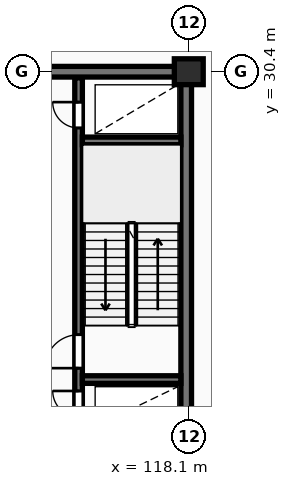
"""IFC4 building model, lengths in metres.
Left out: names, types, materials, properties, quantities, classifications, styles, units other than length and angle.
Written with IfcOpenShell. Run it as: python <this file> out.ifc"""

import sys

from ifc_helpers import new_model, si_unit, direction, frame, frame_2d, origin, origin_2d, place, context, subcontext, project, spatial, rectangle, extrude, element, fill, save


model = new_model("IFC4")
c1 = context("Model", 3, precision=1e-05, world=origin(), true_north=direction((0.0, 1.0)))
c2 = subcontext(c1, "Body", "Model", "MODEL_VIEW")
j1 = project(units=[si_unit("LENGTHUNIT", "METRE"), si_unit("PLANEANGLEUNIT", "RADIAN")], contexts=[c1])
p1 = place(None, origin())
s1 = spatial("IfcSite", under=j1, at=p1, CompositionType="ELEMENT")
p2 = place(p1, origin())
s2 = spatial("IfcBuilding", under=s1, at=p2, CompositionType="ELEMENT")
p3 = place(p2, frame((0.0, 0.0, 76.0)))
s3 = spatial("IfcBuildingStorey", under=s2, at=p3, CompositionType="ELEMENT", Elevation=76.0)
p4 = place(p3, frame((118.1, 30.4, 0.0), z_axis=(0.0, 0.0, 1.0), x_axis=(1.0, 0.0, 0.0)))
e1 = element("IfcColumn", 1, at=p4, inside=s3, PredefinedType="COLUMN", context=c2, shape_type="SweptSolid", body=[
    extrude(rectangle(XDim=0.95, YDim=0.85, at=origin_2d()), origin(), (0.0, 0.0, 1.0), 4.8),
])
p5 = place(p3, frame((81.925, 30.4, 0.0), z_axis=(0.0, 0.0, 1.0), x_axis=(1.0, 0.0, 0.0)))
e2 = element("IfcWall", 2, at=p5, inside=s3, PredefinedType="SHEAR", context=c2, shape_type="SweptSolid", body=[
    extrude(rectangle(XDim=36.265, YDim=0.35, at=frame_2d((18.132, 0.0))), origin(), (0.0, 0.0, 1.0), 4.8),
])
p6 = place(p3, frame((118.015, 18.575, 0.0), z_axis=(0.0, 0.0, 1.0), x_axis=(0.0, 1.0, 0.0)))
e3 = element("IfcWall", 3, at=p6, inside=s3, PredefinedType="SHEAR", context=c2, shape_type="SweptSolid", body=[
    extrude(rectangle(XDim=11.65, YDim=0.35, at=frame_2d((5.825, 0.0))), origin(), (0.0, 0.0, 1.0), 4.8),
])
p7 = place(p3, frame((114.475, 18.6, 0.0), z_axis=(0.0, 0.0, 1.0), x_axis=(0.0, 1.0, 0.0)))
e4 = element("IfcWall", 4, at=p7, inside=s3, PredefinedType="SHEAR", context=c2, shape_type="SweptSolid", body=[
    extrude(rectangle(XDim=11.6, YDim=0.25, at=frame_2d((5.8, 0.0))), origin(), (0.0, 0.0, 1.0), 4.8),
])
p8 = place(p7, frame((0.45, 0.0, 0.0)))
e5 = element("IfcOpeningElement", 5, at=p8, cuts=e4, PredefinedType="OPENING", context=c2, shape_type="SweptSolid", body=[
    extrude(rectangle(XDim=0.85, YDim=2.05, at=frame_2d((0.425, 1.025))), frame((0.0, 0.135, 0.0), z_axis=(0.0, -1.0, 0.0), x_axis=(1.0, 0.0, 0.0)), (0.0, 0.0, 1.0), 0.27),
])
p9 = place(p7, frame((2.05, 0.0, 0.0)))
e6 = element("IfcOpeningElement", 6, at=p9, cuts=e4, PredefinedType="OPENING", context=c2, shape_type="SweptSolid", body=[
    extrude(rectangle(XDim=1.1, YDim=2.1, at=frame_2d((0.55, 1.05))), frame((0.0, 0.135, 0.0), z_axis=(0.0, -1.0, 0.0), x_axis=(1.0, 0.0, 0.0)), (0.0, 0.0, 1.0), 0.27),
])
p10 = place(p7, frame((9.95, 0.0, 0.0)))
e7 = element("IfcOpeningElement", 7, at=p10, cuts=e4, PredefinedType="OPENING", context=c2, shape_type="SweptSolid", body=[
    extrude(rectangle(XDim=0.85, YDim=2.05, at=frame_2d((0.425, 1.025))), frame((0.0, 0.135, 0.0), z_axis=(0.0, -1.0, 0.0), x_axis=(1.0, 0.0, 0.0)), (0.0, 0.0, 1.0), 0.27),
])
for number, where, z_axis, x_axis in (
    (8, (114.6, 20.275, 0.0), (0.0, 0.0, 1.0), (1.0, 0.0, 0.0)),
    (9, (114.6, 28.125, 0.0), (0.0, 0.0, 1.0), (1.0, 0.0, 0.0)),
):
    element("IfcWall", number, at=place(p3, frame(where, z_axis=z_axis, x_axis=x_axis)), inside=s3, PredefinedType="SHEAR", context=c2, shape_type="SweptSolid", body=[
        extrude(rectangle(XDim=3.24, YDim=0.25, at=frame_2d((1.62, 0.0))), origin(), (0.0, 0.0, 1.0), 4.8),
    ])
p11 = place(p8, origin())
e10 = element("IfcDoor", 10, at=p11, inside=s3, OperationType="SINGLE_SWING_RIGHT", PredefinedType="DOOR", context=c2, shape_type="SweptSolid", body=[
    extrude(rectangle(XDim=0.85, YDim=2.05, at=frame_2d((0.425, 1.025))), frame((0.0, 0.025, 0.0), z_axis=(0.0, -1.0, 0.0), x_axis=(1.0, 0.0, 0.0)), (0.0, 0.0, 1.0), 0.05),
])
fill(e5, e10)
p12 = place(p9, origin())
e11 = element("IfcDoor", 11, at=p12, inside=s3, OperationType="SINGLE_SWING_LEFT", PredefinedType="DOOR", context=c2, shape_type="SweptSolid", body=[
    extrude(rectangle(XDim=1.1, YDim=2.1, at=frame_2d((0.55, 1.05))), frame((0.0, 0.025, 0.0), z_axis=(0.0, -1.0, 0.0), x_axis=(1.0, 0.0, 0.0)), (0.0, 0.0, 1.0), 0.05),
])
fill(e6, e11)
p13 = place(p10, origin())
e12 = element("IfcDoor", 12, at=p13, inside=s3, OperationType="SINGLE_SWING_RIGHT", PredefinedType="DOOR", context=c2, shape_type="SweptSolid", body=[
    extrude(rectangle(XDim=0.85, YDim=2.05, at=frame_2d((0.425, 1.025))), frame((0.0, 0.025, 0.0), z_axis=(0.0, -1.0, 0.0), x_axis=(1.0, 0.0, 0.0)), (0.0, 0.0, 1.0), 0.05),
])
fill(e7, e12)
save(model, sys.argv[1])
